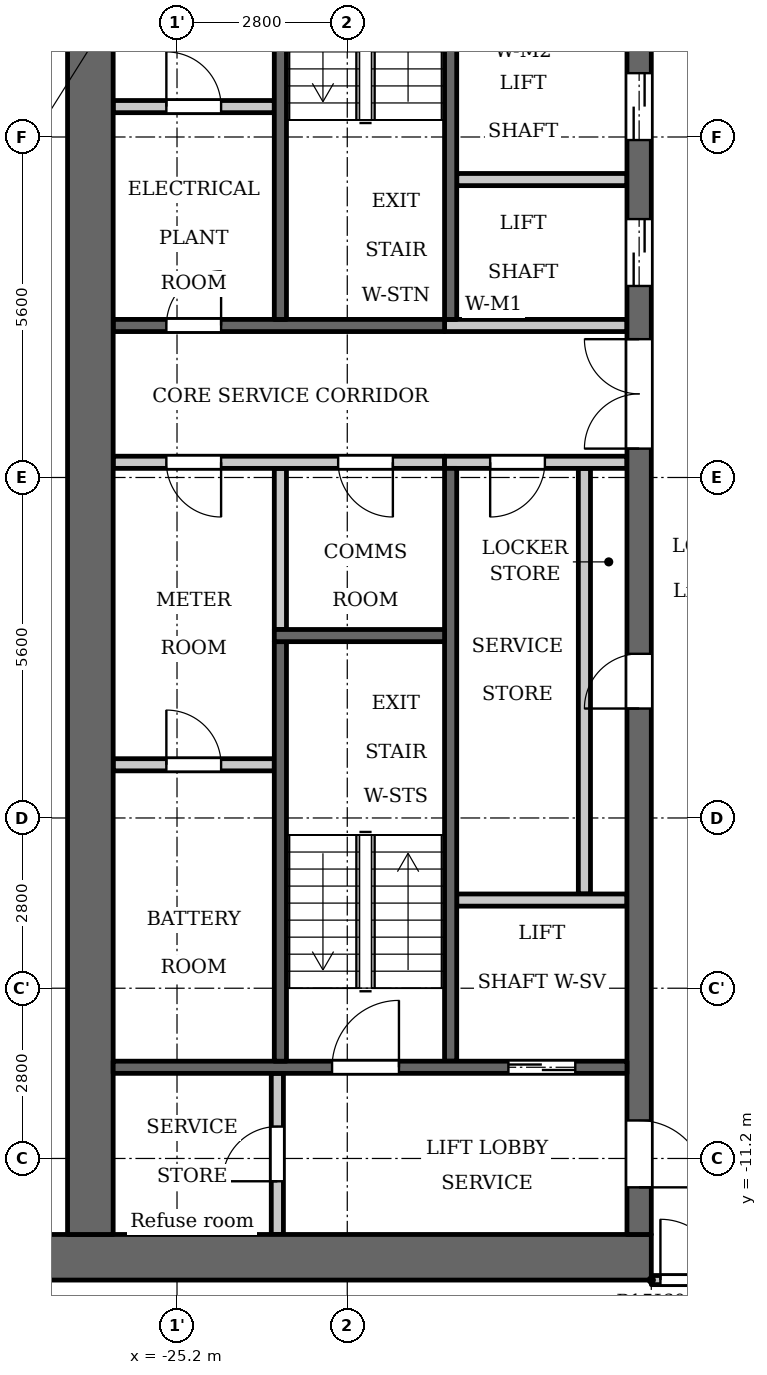
"""IFC4 building model, lengths in metres.
Left out: names, types, materials, properties, quantities, classifications, styles, units other than length and angle.
Written with IfcOpenShell. Run it as: python <this file> out.ifc"""

import sys

from ifc_helpers import new_model, si_unit, direction, frame, frame_2d, origin, place, context, subcontext, project, spatial, rectangle, extrude, element, fill, save


model = new_model("IFC4")
c1 = context("Model", 3, precision=1e-05, world=origin(), true_north=direction((0.0, 1.0)))
c2 = subcontext(c1, "Body", "Model", "MODEL_VIEW")
j1 = project(units=[si_unit("LENGTHUNIT", "METRE"), si_unit("PLANEANGLEUNIT", "RADIAN")], contexts=[c1])
p1 = place(None, origin())
s1 = spatial("IfcSite", under=j1, at=p1, CompositionType="ELEMENT")
p2 = place(p1, origin())
s2 = spatial("IfcBuilding", under=s1, at=p2, CompositionType="ELEMENT")
p3 = place(p2, frame((0.0, 0.0, 164.1)))
s3 = spatial("IfcBuildingStorey", under=s2, at=p3, CompositionType="ELEMENT", Elevation=164.1)
p4 = place(p3, frame((-23.5, -2.5, 0.0), z_axis=(0.0, 0.0, 1.0), x_axis=(0.0, 1.0, 0.0)))
e1 = element("IfcWall", 1, at=p4, inside=s3, PredefinedType="PARTITIONING", context=c2, shape_type="SweptSolid", body=[
    extrude(rectangle(XDim=2.65, YDim=0.2, at=frame_2d((1.325, 0.0))), origin(), (0.0, 0.0, 1.0), 3.2),
])
p5 = place(p3, frame((-20.7, 2.6, 0.0), z_axis=(0.0, 0.0, 1.0), x_axis=(0.0, 1.0, 0.0)))
e2 = element("IfcWall", 2, at=p5, inside=s3, PredefinedType="SHEAR", context=c2, shape_type="SweptSolid", body=[
    extrude(rectangle(XDim=7.0, YDim=0.2, at=frame_2d((3.5, 0.0))), origin(), (0.0, 0.0, 1.0), 3.2),
])
p6 = place(p3, frame((-20.7, -9.6, 0.0), z_axis=(0.0, 0.0, 1.0), x_axis=(0.0, 1.0, 0.0)))
e3 = element("IfcWall", 3, at=p6, inside=s3, PredefinedType="SHEAR", context=c2, shape_type="SweptSolid", body=[
    extrude(rectangle(XDim=9.75, YDim=0.2, at=frame_2d((4.875, 0.0))), origin(), (0.0, 0.0, 1.0), 3.2),
])
p7 = place(p3, frame((-20.8, 2.5, 0.0), z_axis=(0.0, 0.0, 1.0), x_axis=(-1.0, 0.0, 0.0)))
e4 = element("IfcWall", 4, at=p7, inside=s3, PredefinedType="SHEAR", context=c2, shape_type="SweptSolid", body=[
    extrude(rectangle(XDim=5.45, YDim=0.2, at=frame_2d((2.725, 0.0))), origin(), (0.0, 0.0, 1.0), 3.2),
])
p8 = place(p7, frame((3.675, 0.0, 0.0)))
e5 = element("IfcOpeningElement", 5, at=p8, cuts=e4, PredefinedType="OPENING", context=c2, shape_type="SweptSolid", body=[
    extrude(rectangle(XDim=0.9, YDim=2.1, at=frame_2d((0.45, 1.05))), frame((0.0, 0.11, 0.0), z_axis=(0.0, -1.0, 0.0), x_axis=(1.0, 0.0, 0.0)), (0.0, 0.0, 1.0), 0.22),
])
p9 = place(p3, frame((-20.8, 0.25, 0.0), z_axis=(0.0, 0.0, 1.0), x_axis=(-1.0, 0.0, 0.0)))
e6 = element("IfcWall", 6, at=p9, inside=s3, PredefinedType="PARTITIONING", context=c2, shape_type="SweptSolid", body=[
    extrude(rectangle(XDim=5.45, YDim=0.2, at=frame_2d((2.725, 0.0))), origin(), (0.0, 0.0, 1.0), 3.2),
])
p10 = place(p9, frame((0.85, 0.0, 0.0)))
e7 = element("IfcOpeningElement", 7, at=p10, cuts=e6, PredefinedType="OPENING", context=c2, shape_type="SweptSolid", body=[
    extrude(rectangle(XDim=0.9, YDim=2.1, at=frame_2d((0.45, 1.05))), frame((0.0, 0.11, 0.0), z_axis=(0.0, -1.0, 0.0), x_axis=(1.0, 0.0, 0.0)), (0.0, 0.0, 1.0), 0.22),
])
p11 = place(p9, frame((3.675, 0.0, 0.0)))
e8 = element("IfcOpeningElement", 8, at=p11, cuts=e6, PredefinedType="OPENING", context=c2, shape_type="SweptSolid", body=[
    extrude(rectangle(XDim=0.9, YDim=2.1, at=frame_2d((0.45, 1.05))), frame((0.0, 0.11, 0.0), z_axis=(0.0, -1.0, 0.0), x_axis=(1.0, 0.0, 0.0)), (0.0, 0.0, 1.0), 0.22),
])
p12 = place(p3, frame((-17.4, -12.825, 0.0), z_axis=(0.0, 0.0, 1.0), x_axis=(-1.0, 0.0, 0.0)))
e9 = element("IfcWall", 9, at=p12, inside=s3, PredefinedType="SHEAR", context=c2, shape_type="SweptSolid", body=[
    extrude(rectangle(XDim=10.4, YDim=0.75, at=frame_2d((5.2, 0.0))), origin(), (0.0, 0.0, 1.0), 3.2),
])
p13 = place(p3, frame((-18.5, -6.85, 0.0), z_axis=(0.0, 0.0, 1.0), x_axis=(0.0, 1.0, 0.0)))
e10 = element("IfcWall", 10, at=p13, inside=s3, PredefinedType="PARTITIONING", context=c2, shape_type="SweptSolid", body=[
    extrude(rectangle(XDim=7.0, YDim=0.2, at=frame_2d((3.5, 0.0))), origin(), (0.0, 0.0, 1.0), 3.2),
])
p14 = place(p3, frame((-17.6, -12.45, 0.0), z_axis=(0.0, 0.0, 1.0), x_axis=(0.0, 1.0, 0.0)))
e11 = element("IfcWall", 11, at=p14, inside=s3, PredefinedType="SHEAR", context=c2, shape_type="SweptSolid", body=[
    extrude(rectangle(XDim=24.9, YDim=0.4, at=frame_2d((12.45, 0.0))), origin(), (0.0, 0.0, 1.0), 3.2),
])
p15 = place(p14, frame((8.65, 0.0, 0.0)))
e12 = element("IfcOpeningElement", 12, at=p15, cuts=e11, PredefinedType="OPENING", context=c2, shape_type="SweptSolid", body=[
    extrude(rectangle(XDim=0.9, YDim=2.1, at=frame_2d((0.45, 1.05))), frame((0.0, 0.21, 0.0), z_axis=(0.0, -1.0, 0.0), x_axis=(1.0, 0.0, 0.0)), (0.0, 0.0, 1.0), 0.42),
])
p16 = place(p14, frame((15.6, 0.0, 0.0)))
e13 = element("IfcOpeningElement", 13, at=p16, cuts=e11, PredefinedType="OPENING", context=c2, shape_type="SweptSolid", body=[
    extrude(rectangle(XDim=1.1, YDim=2.1, at=frame_2d((0.55, 1.05))), frame((0.0, 0.21, 0.0), z_axis=(0.0, -1.0, 0.0), x_axis=(1.0, 0.0, 0.0)), (0.0, 0.0, 1.0), 0.42),
])
p17 = place(p14, frame((18.0, 0.0, 0.0)))
e14 = element("IfcOpeningElement", 14, at=p17, cuts=e11, PredefinedType="OPENING", context=c2, shape_type="SweptSolid", body=[
    extrude(rectangle(XDim=1.1, YDim=2.1, at=frame_2d((0.55, 1.05))), frame((0.0, 0.21, 0.0), z_axis=(0.0, -1.0, 0.0), x_axis=(1.0, 0.0, 0.0)), (0.0, 0.0, 1.0), 0.42),
])
p18 = place(p14, frame((23.025, 0.0, 0.0)))
e15 = element("IfcOpeningElement", 15, at=p18, cuts=e11, PredefinedType="OPENING", context=c2, shape_type="SweptSolid", body=[
    extrude(rectangle(XDim=1.1, YDim=2.1, at=frame_2d((0.55, 1.05))), frame((0.0, 0.21, 0.0), z_axis=(0.0, -1.0, 0.0), x_axis=(1.0, 0.0, 0.0)), (0.0, 0.0, 1.0), 0.42),
])
p19 = place(p14, frame((0.775, 0.0, 0.0)))
e16 = element("IfcOpeningElement", 16, at=p19, cuts=e11, PredefinedType="OPENING", context=c2, shape_type="SweptSolid", body=[
    extrude(rectangle(XDim=1.1, YDim=2.1, at=frame_2d((0.55, 1.05))), frame((0.0, 0.21, 0.0), z_axis=(0.0, -1.0, 0.0), x_axis=(1.0, 0.0, 0.0)), (0.0, 0.0, 1.0), 0.42),
])
p20 = place(p14, frame((12.925, 0.0, 0.0)))
e17 = element("IfcOpeningElement", 17, at=p20, cuts=e11, PredefinedType="OPENING", context=c2, shape_type="SweptSolid", body=[
    extrude(rectangle(XDim=1.8, YDim=2.1, at=frame_2d((0.9, 1.05))), frame((0.0, 0.21, 0.0), z_axis=(0.0, -1.0, 0.0), x_axis=(1.0, 0.0, 0.0)), (0.0, 0.0, 1.0), 0.42),
])
p21 = place(p3, frame((-26.625, -12.45, 0.0), z_axis=(0.0, 0.0, 1.0), x_axis=(0.0, 1.0, 0.0)))
e18 = element("IfcWall", 18, at=p21, inside=s3, PredefinedType="SHEAR", context=c2, shape_type="SweptSolid", body=[
    extrude(rectangle(XDim=24.9, YDim=0.75, at=frame_2d((12.45, 0.0))), origin(), (0.0, 0.0, 1.0), 3.2),
])
p22 = place(p3, frame((-23.55, -12.45, 0.0), z_axis=(0.0, 0.0, 1.0), x_axis=(0.0, 1.0, 0.0)))
e19 = element("IfcWall", 19, at=p22, inside=s3, PredefinedType="PARTITIONING", context=c2, shape_type="SweptSolid", body=[
    extrude(rectangle(XDim=2.65, YDim=0.2, at=frame_2d((1.325, 0.0))), origin(), (0.0, 0.0, 1.0), 3.2),
])
p23 = place(p22, frame((0.875, 0.0, 0.0)))
e20 = element("IfcOpeningElement", 20, at=p23, cuts=e19, PredefinedType="OPENING", context=c2, shape_type="SweptSolid", body=[
    extrude(rectangle(XDim=0.9, YDim=2.1, at=frame_2d((0.45, 1.05))), frame((0.0, 0.11, 0.0), z_axis=(0.0, -1.0, 0.0), x_axis=(1.0, 0.0, 0.0)), (0.0, 0.0, 1.0), 0.22),
])
p24 = place(p3, frame((-23.6, -4.725, 0.0), z_axis=(0.0, 0.0, 1.0), x_axis=(-1.0, 0.0, 0.0)))
e21 = element("IfcWall", 21, at=p24, inside=s3, PredefinedType="PARTITIONING", context=c2, shape_type="SweptSolid", body=[
    extrude(rectangle(XDim=2.65, YDim=0.2, at=frame_2d((1.325, 0.0))), origin(), (0.0, 0.0, 1.0), 3.2),
])
p25 = place(p24, frame((0.875, 0.0, 0.0)))
e22 = element("IfcOpeningElement", 22, at=p25, cuts=e21, PredefinedType="OPENING", context=c2, shape_type="SweptSolid", body=[
    extrude(rectangle(XDim=0.9, YDim=2.1, at=frame_2d((0.45, 1.05))), frame((0.0, 0.11, 0.0), z_axis=(0.0, -1.0, 0.0), x_axis=(1.0, 0.0, 0.0)), (0.0, 0.0, 1.0), 0.22),
])
p26 = place(p3, frame((-23.6, 6.1, 0.0), z_axis=(0.0, 0.0, 1.0), x_axis=(-1.0, 0.0, 0.0)))
e23 = element("IfcWall", 23, at=p26, inside=s3, PredefinedType="PARTITIONING", context=c2, shape_type="SweptSolid", body=[
    extrude(rectangle(XDim=2.65, YDim=0.2, at=frame_2d((1.325, 0.0))), origin(), (0.0, 0.0, 1.0), 3.2),
])
p27 = place(p26, frame((0.875, 0.0, 0.0)))
e24 = element("IfcOpeningElement", 24, at=p27, cuts=e23, PredefinedType="OPENING", context=c2, shape_type="SweptSolid", body=[
    extrude(rectangle(XDim=0.9, YDim=2.1, at=frame_2d((0.45, 1.05))), frame((0.0, 0.11, 0.0), z_axis=(0.0, -1.0, 0.0), x_axis=(1.0, 0.0, 0.0)), (0.0, 0.0, 1.0), 0.22),
])
p28 = place(p3, frame((-17.8, -9.7, 0.0), z_axis=(0.0, 0.0, 1.0), x_axis=(-1.0, 0.0, 0.0)))
e25 = element("IfcWall", 25, at=p28, inside=s3, PredefinedType="SHEAR", context=c2, shape_type="SweptSolid", body=[
    extrude(rectangle(XDim=8.45, YDim=0.2, at=frame_2d((4.225, 0.0))), origin(), (0.0, 0.0, 1.0), 3.2),
])
p29 = place(p28, frame((0.85, 0.0, 0.0)))
e26 = element("IfcOpeningElement", 26, at=p29, cuts=e25, PredefinedType="OPENING", context=c2, shape_type="SweptSolid", body=[
    extrude(rectangle(XDim=1.1, YDim=2.1, at=frame_2d((0.55, 1.05))), frame((0.0, 0.11, 0.0), z_axis=(0.0, -1.0, 0.0), x_axis=(1.0, 0.0, 0.0)), (0.0, 0.0, 1.0), 0.22),
])
p30 = place(p28, frame((3.75, 0.0, 0.0)))
e27 = element("IfcOpeningElement", 27, at=p30, cuts=e25, PredefinedType="OPENING", context=c2, shape_type="SweptSolid", body=[
    extrude(rectangle(XDim=1.1, YDim=2.1, at=frame_2d((0.55, 1.05))), frame((0.0, 0.11, 0.0), z_axis=(0.0, -1.0, 0.0), x_axis=(1.0, 0.0, 0.0)), (0.0, 0.0, 1.0), 0.22),
])
p31 = place(p3, frame((-17.8, -6.95, 0.0), z_axis=(0.0, 0.0, 1.0), x_axis=(-1.0, 0.0, 0.0)))
e28 = element("IfcWall", 28, at=p31, inside=s3, PredefinedType="PARTITIONING", context=c2, shape_type="SweptSolid", body=[
    extrude(rectangle(XDim=2.8, YDim=0.2, at=frame_2d((1.4, 0.0))), origin(), (0.0, 0.0, 1.0), 3.2),
])
p32 = place(p3, frame((-17.8, 0.25, 0.0), z_axis=(0.0, 0.0, 1.0), x_axis=(-1.0, 0.0, 0.0)))
e29 = element("IfcWall", 29, at=p32, inside=s3, PredefinedType="PARTITIONING", context=c2, shape_type="SweptSolid", body=[
    extrude(rectangle(XDim=3.0, YDim=0.2, at=frame_2d((1.5, 0.0))), origin(), (0.0, 0.0, 1.0), 3.2),
])
p33 = place(p32, frame((1.35, 0.0, 0.0)))
e30 = element("IfcOpeningElement", 30, at=p33, cuts=e29, PredefinedType="OPENING", context=c2, shape_type="SweptSolid", body=[
    extrude(rectangle(XDim=0.9, YDim=2.1, at=frame_2d((0.45, 1.05))), frame((0.0, 0.11, 0.0), z_axis=(0.0, -1.0, 0.0), x_axis=(1.0, 0.0, 0.0)), (0.0, 0.0, 1.0), 0.22),
])
p34 = place(p3, frame((-17.8, 2.5, 0.0), z_axis=(0.0, 0.0, 1.0), x_axis=(-1.0, 0.0, 0.0)))
e31 = element("IfcWall", 31, at=p34, inside=s3, PredefinedType="PARTITIONING", context=c2, shape_type="SweptSolid", body=[
    extrude(rectangle(XDim=3.0, YDim=0.2, at=frame_2d((1.5, 0.0))), origin(), (0.0, 0.0, 1.0), 3.2),
])
p35 = place(p3, frame((-17.8, 4.9, 0.0), z_axis=(0.0, 0.0, 1.0), x_axis=(-1.0, 0.0, 0.0)))
e32 = element("IfcWall", 32, at=p35, inside=s3, PredefinedType="PARTITIONING", context=c2, shape_type="SweptSolid", body=[
    extrude(rectangle(XDim=2.8, YDim=0.2, at=frame_2d((1.4, 0.0))), origin(), (0.0, 0.0, 1.0), 3.2),
])
p36 = place(p3, frame((-23.5, 2.6, 0.0), z_axis=(0.0, 0.0, 1.0), x_axis=(0.0, 1.0, 0.0)))
e33 = element("IfcWall", 33, at=p36, inside=s3, PredefinedType="SHEAR", context=c2, shape_type="SweptSolid", body=[
    extrude(rectangle(XDim=7.0, YDim=0.2, at=frame_2d((3.5, 0.0))), origin(), (0.0, 0.0, 1.0), 3.2),
])
p37 = place(p3, frame((-23.5, -9.6, 0.0), z_axis=(0.0, 0.0, 1.0), x_axis=(0.0, 1.0, 0.0)))
e34 = element("IfcWall", 34, at=p37, inside=s3, PredefinedType="SHEAR", context=c2, shape_type="SweptSolid", body=[
    extrude(rectangle(XDim=6.9, YDim=0.2, at=frame_2d((3.45, 0.0))), origin(), (0.0, 0.0, 1.0), 3.2),
])
p38 = place(p3, frame((-20.8, -2.6, 0.0), z_axis=(0.0, 0.0, 1.0), x_axis=(-1.0, 0.0, 0.0)))
e35 = element("IfcWall", 35, at=p38, inside=s3, PredefinedType="SHEAR", context=c2, shape_type="SweptSolid", body=[
    extrude(rectangle(XDim=2.8, YDim=0.2, at=frame_2d((1.4, 0.0))), origin(), (0.0, 0.0, 1.0), 3.2),
])
p39 = place(p3, frame((-17.4, -13.2, 0.0), z_axis=(0.0, 0.0, 1.0), x_axis=(1.0, 0.0, 0.0)))
e36 = element("IfcWall", 36, at=p39, inside=s3, PredefinedType="PARTITIONING", context=c2, shape_type="SweptSolid", body=[
    extrude(rectangle(XDim=34.8, YDim=0.15, at=frame_2d((17.4, 0.0))), origin(), (0.0, 0.0, 1.0), 3.2),
])
p40 = place(p39, frame((0.15, 0.0, 0.0)))
e37 = element("IfcOpeningElement", 37, at=p40, cuts=e36, PredefinedType="OPENING", context=c2, shape_type="SweptSolid", body=[
    extrude(rectangle(XDim=1.0, YDim=2.1, at=frame_2d((0.5, 1.05))), frame((0.0, 0.085, 0.0), z_axis=(0.0, -1.0, 0.0), x_axis=(1.0, 0.0, 0.0)), (0.0, 0.0, 1.0), 0.17),
])
p41 = place(p39, frame((33.55, 0.0, 0.0)))
e38 = element("IfcOpeningElement", 38, at=p41, cuts=e36, PredefinedType="OPENING", context=c2, shape_type="SweptSolid", body=[
    extrude(rectangle(XDim=1.0, YDim=2.1, at=frame_2d((0.5, 1.05))), frame((0.0, 0.085, 0.0), z_axis=(0.0, -1.0, 0.0), x_axis=(1.0, 0.0, 0.0)), (0.0, 0.0, 1.0), 0.17),
])
p42 = place(p39, frame((3.5, 0.0, 0.0)))
e39 = element("IfcOpeningElement", 39, at=p42, cuts=e36, PredefinedType="OPENING", context=c2, shape_type="SweptSolid", body=[
    extrude(rectangle(XDim=1.0, YDim=2.1, at=frame_2d((0.5, 1.05))), frame((0.0, 0.085, 0.0), z_axis=(0.0, -1.0, 0.0), x_axis=(1.0, 0.0, 0.0)), (0.0, 0.0, 1.0), 0.17),
])
p43 = place(p39, frame((10.1, 0.0, 0.0)))
e40 = element("IfcOpeningElement", 40, at=p43, cuts=e36, PredefinedType="OPENING", context=c2, shape_type="SweptSolid", body=[
    extrude(rectangle(XDim=1.0, YDim=2.1, at=frame_2d((0.5, 1.05))), frame((0.0, 0.085, 0.0), z_axis=(0.0, -1.0, 0.0), x_axis=(1.0, 0.0, 0.0)), (0.0, 0.0, 1.0), 0.17),
])
p44 = place(p39, frame((15.7, 0.0, 0.0)))
e41 = element("IfcOpeningElement", 41, at=p44, cuts=e36, PredefinedType="OPENING", context=c2, shape_type="SweptSolid", body=[
    extrude(rectangle(XDim=1.0, YDim=2.1, at=frame_2d((0.5, 1.05))), frame((0.0, 0.085, 0.0), z_axis=(0.0, -1.0, 0.0), x_axis=(1.0, 0.0, 0.0)), (0.0, 0.0, 1.0), 0.17),
])
p45 = place(p39, frame((18.05, 0.0, 0.0)))
e42 = element("IfcOpeningElement", 42, at=p45, cuts=e36, PredefinedType="OPENING", context=c2, shape_type="SweptSolid", body=[
    extrude(rectangle(XDim=1.0, YDim=2.1, at=frame_2d((0.5, 1.05))), frame((0.0, 0.085, 0.0), z_axis=(0.0, -1.0, 0.0), x_axis=(1.0, 0.0, 0.0)), (0.0, 0.0, 1.0), 0.17),
])
p46 = place(p39, frame((26.9, 0.0, 0.0)))
e43 = element("IfcOpeningElement", 43, at=p46, cuts=e36, PredefinedType="OPENING", context=c2, shape_type="SweptSolid", body=[
    extrude(rectangle(XDim=1.0, YDim=2.1, at=frame_2d((0.5, 1.05))), frame((0.0, 0.085, 0.0), z_axis=(0.0, -1.0, 0.0), x_axis=(1.0, 0.0, 0.0)), (0.0, 0.0, 1.0), 0.17),
])
p47 = place(p29, origin())
e44 = element("IfcDoor", 44, at=p47, inside=s3, OperationType="DOUBLE_DOOR_SLIDING", PredefinedType="DOOR", context=c2, shape_type="SweptSolid", body=[
    extrude(rectangle(XDim=1.1, YDim=2.1, at=frame_2d((0.55, 1.05))), frame((0.0, 0.025, 0.0), z_axis=(0.0, -1.0, 0.0), x_axis=(1.0, 0.0, 0.0)), (0.0, 0.0, 1.0), 0.05),
])
fill(e26, e44)
p48 = place(p15, origin())
e45 = element("IfcDoor", 45, at=p48, inside=s3, OperationType="SINGLE_SWING_RIGHT", PredefinedType="DOOR", context=c2, shape_type="SweptSolid", body=[
    extrude(rectangle(XDim=0.9, YDim=2.1, at=frame_2d((0.45, 1.05))), frame((0.0, 0.025, 0.0), z_axis=(0.0, -1.0, 0.0), x_axis=(1.0, 0.0, 0.0)), (0.0, 0.0, 1.0), 0.05),
])
fill(e12, e45)
p49 = place(p33, origin())
e46 = element("IfcDoor", 46, at=p49, inside=s3, OperationType="SINGLE_SWING_LEFT", PredefinedType="DOOR", context=c2, shape_type="SweptSolid", body=[
    extrude(rectangle(XDim=0.9, YDim=2.1, at=frame_2d((0.45, 1.05))), frame((0.0, 0.025, 0.0), z_axis=(0.0, -1.0, 0.0), x_axis=(1.0, 0.0, 0.0)), (0.0, 0.0, 1.0), 0.05),
])
fill(e30, e46)
p50 = place(p16, origin())
e47 = element("IfcDoor", 47, at=p50, inside=s3, OperationType="DOUBLE_DOOR_SLIDING", PredefinedType="DOOR", context=c2, shape_type="SweptSolid", body=[
    extrude(rectangle(XDim=1.1, YDim=2.1, at=frame_2d((0.55, 1.05))), frame((0.0, 0.025, 0.0), z_axis=(0.0, -1.0, 0.0), x_axis=(1.0, 0.0, 0.0)), (0.0, 0.0, 1.0), 0.05),
])
fill(e13, e47)
p51 = place(p17, origin())
e48 = element("IfcDoor", 48, at=p51, inside=s3, OperationType="DOUBLE_DOOR_SLIDING", PredefinedType="DOOR", context=c2, shape_type="SweptSolid", body=[
    extrude(rectangle(XDim=1.1, YDim=2.1, at=frame_2d((0.55, 1.05))), frame((0.0, 0.025, 0.0), z_axis=(0.0, -1.0, 0.0), x_axis=(1.0, 0.0, 0.0)), (0.0, 0.0, 1.0), 0.05),
])
fill(e14, e48)
p52 = place(p19, origin())
e49 = element("IfcDoor", 49, at=p52, inside=s3, OperationType="SINGLE_SWING_LEFT", PredefinedType="DOOR", context=c2, shape_type="SweptSolid", body=[
    extrude(rectangle(XDim=1.1, YDim=2.1, at=frame_2d((0.55, 1.05))), frame((0.0, 0.025, 0.0), z_axis=(0.0, -1.0, 0.0), x_axis=(1.0, 0.0, 0.0)), (0.0, 0.0, 1.0), 0.05),
])
fill(e16, e49)
p53 = place(p23, origin())
e50 = element("IfcDoor", 50, at=p53, inside=s3, OperationType="SINGLE_SWING_RIGHT", PredefinedType="DOOR", context=c2, shape_type="SweptSolid", body=[
    extrude(rectangle(XDim=0.9, YDim=2.1, at=frame_2d((0.45, 1.05))), frame((0.0, 0.025, 0.0), z_axis=(0.0, -1.0, 0.0), x_axis=(1.0, 0.0, 0.0)), (0.0, 0.0, 1.0), 0.05),
])
fill(e20, e50)
p54 = place(p30, origin())
e51 = element("IfcDoor", 51, at=p54, inside=s3, OperationType="SINGLE_SWING_LEFT", PredefinedType="DOOR", context=c2, shape_type="SweptSolid", body=[
    extrude(rectangle(XDim=1.1, YDim=2.1, at=frame_2d((0.55, 1.05))), frame((0.0, 0.025, 0.0), z_axis=(0.0, -1.0, 0.0), x_axis=(1.0, 0.0, 0.0)), (0.0, 0.0, 1.0), 0.05),
])
fill(e27, e51)
p55 = place(p20, origin())
e52 = element("IfcDoor", 52, at=p55, inside=s3, OperationType="DOUBLE_DOOR_SINGLE_SWING", PredefinedType="DOOR", context=c2, shape_type="SweptSolid", body=[
    extrude(rectangle(XDim=1.8, YDim=2.1, at=frame_2d((0.9, 1.05))), frame((0.0, 0.025, 0.0), z_axis=(0.0, -1.0, 0.0), x_axis=(1.0, 0.0, 0.0)), (0.0, 0.0, 1.0), 0.05),
])
fill(e17, e52)
p56 = place(p10, origin())
e53 = element("IfcDoor", 53, at=p56, inside=s3, OperationType="SINGLE_SWING_RIGHT", PredefinedType="DOOR", context=c2, shape_type="SweptSolid", body=[
    extrude(rectangle(XDim=0.9, YDim=2.1, at=frame_2d((0.45, 1.05))), frame((0.0, 0.025, 0.0), z_axis=(0.0, -1.0, 0.0), x_axis=(1.0, 0.0, 0.0)), (0.0, 0.0, 1.0), 0.05),
])
fill(e7, e53)
p57 = place(p25, origin())
e54 = element("IfcDoor", 54, at=p57, inside=s3, OperationType="SINGLE_SWING_RIGHT", PredefinedType="DOOR", context=c2, shape_type="SweptSolid", body=[
    extrude(rectangle(XDim=0.9, YDim=2.1, at=frame_2d((0.45, 1.05))), frame((0.0, 0.025, 0.0), z_axis=(0.0, -1.0, 0.0), x_axis=(1.0, 0.0, 0.0)), (0.0, 0.0, 1.0), 0.05),
])
fill(e22, e54)
p58 = place(p11, origin())
e55 = element("IfcDoor", 55, at=p58, inside=s3, OperationType="SINGLE_SWING_RIGHT", PredefinedType="DOOR", context=c2, shape_type="SweptSolid", body=[
    extrude(rectangle(XDim=0.9, YDim=2.1, at=frame_2d((0.45, 1.05))), frame((0.0, 0.025, 0.0), z_axis=(0.0, -1.0, 0.0), x_axis=(1.0, 0.0, 0.0)), (0.0, 0.0, 1.0), 0.05),
])
fill(e8, e55)
p59 = place(p27, origin())
e56 = element("IfcDoor", 56, at=p59, inside=s3, OperationType="SINGLE_SWING_RIGHT", PredefinedType="DOOR", context=c2, shape_type="SweptSolid", body=[
    extrude(rectangle(XDim=0.9, YDim=2.1, at=frame_2d((0.45, 1.05))), frame((0.0, 0.025, 0.0), z_axis=(0.0, -1.0, 0.0), x_axis=(1.0, 0.0, 0.0)), (0.0, 0.0, 1.0), 0.05),
])
fill(e24, e56)
p60 = place(p8, origin())
e57 = element("IfcDoor", 57, at=p60, inside=s3, OperationType="SINGLE_SWING_LEFT", PredefinedType="DOOR", context=c2, shape_type="SweptSolid", body=[
    extrude(rectangle(XDim=0.9, YDim=2.1, at=frame_2d((0.45, 1.05))), frame((0.0, 0.025, 0.0), z_axis=(0.0, -1.0, 0.0), x_axis=(1.0, 0.0, 0.0)), (0.0, 0.0, 1.0), 0.05),
])
fill(e5, e57)
p61 = place(p40, origin())
e58 = element("IfcDoor", 58, at=p61, inside=s3, OperationType="SINGLE_SWING_RIGHT", PredefinedType="DOOR", context=c2, shape_type="SweptSolid", body=[
    extrude(rectangle(XDim=1.0, YDim=2.1, at=frame_2d((0.5, 1.05))), frame((0.0, 0.025, 0.0), z_axis=(0.0, -1.0, 0.0), x_axis=(1.0, 0.0, 0.0)), (0.0, 0.0, 1.0), 0.05),
])
fill(e37, e58)
save(model, sys.argv[1])
